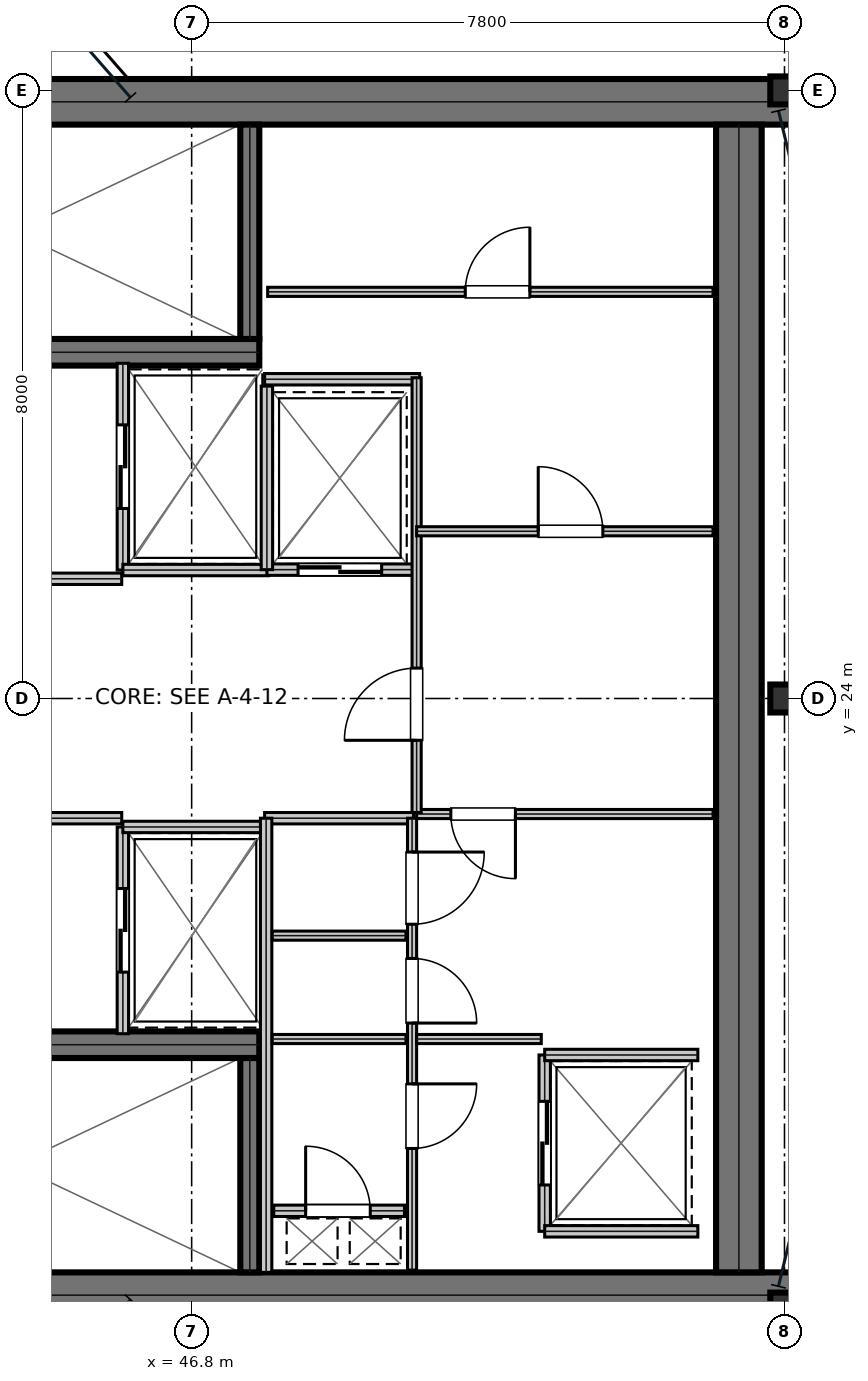
"""IFC4 building model, lengths in metres.
Left out: names, types, materials, properties, quantities, classifications, styles, units other than length and angle.
Written with IfcOpenShell. Run it as: python <this file> out.ifc"""

import sys

from ifc_helpers import new_model, si_unit, direction, frame, frame_2d, origin, origin_2d, place, context, subcontext, project, spatial, rectangle, i_section, extrude, element, fill, save


model = new_model("IFC4")
c1 = context("Model", 3, precision=1e-05, world=origin(), true_north=direction((0.0, 1.0)))
c2 = subcontext(c1, "Body", "Model", "MODEL_VIEW")
j1 = project(units=[si_unit("LENGTHUNIT", "METRE"), si_unit("PLANEANGLEUNIT", "RADIAN")], contexts=[c1])
p1 = place(None, origin())
s1 = spatial("IfcSite", under=j1, at=p1, CompositionType="ELEMENT")
p2 = place(p1, origin())
s2 = spatial("IfcBuilding", under=s1, at=p2, CompositionType="ELEMENT")
p3 = place(p2, frame((0.0, 0.0, 270.9)))
s3 = spatial("IfcBuildingStorey", under=s2, at=p3, CompositionType="ELEMENT", Elevation=270.9)
for number, where, z_axis, x_axis in (
    (1, (38.8, 31.85, 0.0), (0.0, 0.0, 1.0), (1.0, 0.0, 0.0)),
    (2, (38.8, 16.15, 0.0), (0.0, 0.0, 1.0), (1.0, 0.0, 0.0)),
):
    element("IfcWall", number, at=place(p3, frame(where, z_axis=z_axis, x_axis=x_axis)), inside=s3, PredefinedType="SHEAR", context=c2, shape_type="SweptSolid", body=[
        extrude(rectangle(XDim=16.0, YDim=0.6, at=frame_2d((8.0, 0.0))), origin(), (0.0, 0.0, 1.0), 3.81),
    ])
p4 = place(p3, frame((54.0, 16.45, 0.0), z_axis=(0.0, 0.0, 1.0), x_axis=(0.0, 1.0, 0.0)))
e3 = element("IfcWall", 3, at=p4, inside=s3, PredefinedType="SHEAR", context=c2, shape_type="SweptSolid", body=[
    extrude(rectangle(XDim=15.1, YDim=0.6, at=frame_2d((7.55, 0.0))), origin(), (0.0, 0.0, 1.0), 3.81),
])
p5 = place(p3, frame((39.98, 28.555, 0.0), z_axis=(0.0, 0.0, 1.0), x_axis=(1.0, 0.0, 0.0)))
e4 = element("IfcWall", 4, at=p5, inside=s3, PredefinedType="SHEAR", context=c2, shape_type="SweptSolid", body=[
    extrude(rectangle(XDim=7.71, YDim=0.35, at=frame_2d((3.855, 0.0))), origin(), (0.0, 0.0, 1.0), 3.81),
])
p6 = place(p5, frame((0.25, 0.0, 0.0)))
e5 = element("IfcOpeningElement", 5, at=p6, cuts=e4, PredefinedType="OPENING", context=c2, shape_type="SweptSolid", body=[
    extrude(rectangle(XDim=1.1, YDim=2.15, at=frame_2d((0.55, 1.075))), frame((0.0, 0.185, 0.0), z_axis=(0.0, -1.0, 0.0), x_axis=(1.0, 0.0, 0.0)), (0.0, 0.0, 1.0), 0.37),
])
p7 = place(p3, frame((39.98, 19.445, 0.0), z_axis=(0.0, 0.0, 1.0), x_axis=(1.0, 0.0, 0.0)))
e6 = element("IfcWall", 6, at=p7, inside=s3, PredefinedType="SHEAR", context=c2, shape_type="SweptSolid", body=[
    extrude(rectangle(XDim=7.71, YDim=0.35, at=frame_2d((3.855, 0.0))), origin(), (0.0, 0.0, 1.0), 3.81),
])
p8 = place(p7, frame((0.25, 0.0, 0.0)))
e7 = element("IfcOpeningElement", 7, at=p8, cuts=e6, PredefinedType="OPENING", context=c2, shape_type="SweptSolid", body=[
    extrude(rectangle(XDim=1.1, YDim=2.15, at=frame_2d((0.55, 1.075))), frame((0.0, 0.185, 0.0), z_axis=(0.0, -1.0, 0.0), x_axis=(1.0, 0.0, 0.0)), (0.0, 0.0, 1.0), 0.37),
])
for number, where, z_axis, x_axis in (
    (8, (47.565, 28.73, 0.0), (0.0, 0.0, 1.0), (0.0, 1.0, 0.0)),
    (9, (47.565, 16.45, 0.0), (0.0, 0.0, 1.0), (0.0, 1.0, 0.0)),
):
    element("IfcWall", number, at=place(p3, frame(where, z_axis=z_axis, x_axis=x_axis)), inside=s3, PredefinedType="SHEAR", context=c2, shape_type="SweptSolid", body=[
        extrude(rectangle(XDim=2.82, YDim=0.25, at=frame_2d((1.41, 0.0))), origin(), (0.0, 0.0, 1.0), 3.81),
    ])
for number, where, z_axis, x_axis in (
    (10, (54.6, 16.0, 0.0), (0.0, 0.0, 1.0), (1.0, 0.0, 0.0)),
    (11, (54.6, 24.0, 0.0), (0.0, 0.0, 1.0), (1.0, 0.0, 0.0)),
    (12, (54.6, 32.0, 0.0), (0.0, 0.0, 1.0), (1.0, 0.0, 0.0)),
):
    element("IfcColumn", number, at=place(p3, frame(where, z_axis=z_axis, x_axis=x_axis)), inside=s3, PredefinedType="COLUMN", context=c2, shape_type="SweptSolid", body=[
        extrude(i_section(OverallWidth=0.373, OverallDepth=0.368, WebThickness=0.015, FlangeThickness=0.024, at=origin_2d()), origin(), (0.0, 0.0, 1.0), 4.044),
    ])
p9 = place(p3, frame((39.98, 25.575, 0.0), z_axis=(0.0, 0.0, 1.0), x_axis=(1.0, 0.0, 0.0)))
e13 = element("IfcWall", 13, at=p9, inside=s3, PredefinedType="PARTITIONING", context=c2, shape_type="SweptSolid", body=[
    extrude(rectangle(XDim=5.9, YDim=0.15, at=frame_2d((2.95, 0.0))), origin(), (0.0, 0.0, 1.0), 3.81),
])
p10 = place(p9, frame((2.35, 0.0, 0.0)))
e14 = element("IfcOpeningElement", 14, at=p10, cuts=e13, PredefinedType="OPENING", context=c2, shape_type="SweptSolid", body=[
    extrude(rectangle(XDim=1.05, YDim=2.15, at=frame_2d((0.525, 1.075))), frame((0.0, 0.085, 0.0), z_axis=(0.0, -1.0, 0.0), x_axis=(1.0, 0.0, 0.0)), (0.0, 0.0, 1.0), 0.17),
])
p11 = place(p3, frame((39.98, 22.425, 0.0), z_axis=(0.0, 0.0, 1.0), x_axis=(1.0, 0.0, 0.0)))
e15 = element("IfcWall", 15, at=p11, inside=s3, PredefinedType="PARTITIONING", context=c2, shape_type="SweptSolid", body=[
    extrude(rectangle(XDim=5.9, YDim=0.15, at=frame_2d((2.95, 0.0))), origin(), (0.0, 0.0, 1.0), 3.81),
])
p12 = place(p11, frame((2.35, 0.0, 0.0)))
e16 = element("IfcOpeningElement", 16, at=p12, cuts=e15, PredefinedType="OPENING", context=c2, shape_type="SweptSolid", body=[
    extrude(rectangle(XDim=1.05, YDim=2.15, at=frame_2d((0.525, 1.075))), frame((0.0, 0.085, 0.0), z_axis=(0.0, -1.0, 0.0), x_axis=(1.0, 0.0, 0.0)), (0.0, 0.0, 1.0), 0.17),
])
p13 = place(p3, frame((45.895, 25.69, 0.0), z_axis=(0.0, 0.0, 1.0), x_axis=(0.0, 1.0, 0.0)))
e17 = element("IfcWall", 17, at=p13, inside=s3, PredefinedType="PARTITIONING", context=c2, shape_type="SweptSolid", body=[
    extrude(rectangle(XDim=2.72, YDim=0.15, at=frame_2d((1.36, 0.0))), origin(), (0.0, 0.0, 1.0), 3.81),
])
p14 = place(p13, frame((0.81, 0.0, 0.0)))
e18 = element("IfcOpeningElement", 18, at=p14, cuts=e17, PredefinedType="OPENING", context=c2, shape_type="SweptSolid", body=[
    extrude(rectangle(XDim=1.1, YDim=2.15, at=frame_2d((0.55, 1.075))), frame((0.0, 0.085, 0.0), z_axis=(0.0, -1.0, 0.0), x_axis=(1.0, 0.0, 0.0)), (0.0, 0.0, 1.0), 0.17),
])
p15 = place(p3, frame((45.895, 25.69, 0.0), z_axis=(0.0, 0.0, 1.0), x_axis=(1.0, 0.0, 0.0)))
e19 = element("IfcWall", 19, at=p15, inside=s3, PredefinedType="PARTITIONING", context=c2, shape_type="SweptSolid", body=[
    extrude(rectangle(XDim=1.915, YDim=0.15, at=frame_2d((0.958, 0.0))), origin(), (0.0, 0.0, 1.0), 3.81),
])
p16 = place(p3, frame((45.895, 19.59, 0.0), z_axis=(0.0, 0.0, 1.0), x_axis=(0.0, 1.0, 0.0)))
e20 = element("IfcWall", 20, at=p16, inside=s3, PredefinedType="PARTITIONING", context=c2, shape_type="SweptSolid", body=[
    extrude(rectangle(XDim=2.72, YDim=0.15, at=frame_2d((1.36, 0.0))), origin(), (0.0, 0.0, 1.0), 3.81),
])
p17 = place(p16, frame((0.81, 0.0, 0.0)))
e21 = element("IfcOpeningElement", 21, at=p17, cuts=e20, PredefinedType="OPENING", context=c2, shape_type="SweptSolid", body=[
    extrude(rectangle(XDim=1.1, YDim=2.15, at=frame_2d((0.55, 1.075))), frame((0.0, 0.085, 0.0), z_axis=(0.0, -1.0, 0.0), x_axis=(1.0, 0.0, 0.0)), (0.0, 0.0, 1.0), 0.17),
])
p18 = place(p3, frame((45.895, 22.31, 0.0), z_axis=(0.0, 0.0, 1.0), x_axis=(1.0, 0.0, 0.0)))
e22 = element("IfcWall", 22, at=p18, inside=s3, PredefinedType="PARTITIONING", context=c2, shape_type="SweptSolid", body=[
    extrude(rectangle(XDim=1.915, YDim=0.15, at=frame_2d((0.958, 0.0))), origin(), (0.0, 0.0, 1.0), 3.81),
])
p19 = place(p3, frame((47.79, 25.695, 0.0), z_axis=(0.0, 0.0, 1.0), x_axis=(1.0, 0.0, 0.0)))
e23 = element("IfcWall", 23, at=p19, inside=s3, PredefinedType="PARTITIONING", context=c2, shape_type="SweptSolid", body=[
    extrude(rectangle(XDim=1.92, YDim=0.15, at=frame_2d((0.96, 0.0))), origin(), (0.0, 0.0, 1.0), 3.81),
])
p20 = place(p19, frame((0.41, 0.0, 0.0)))
e24 = element("IfcOpeningElement", 24, at=p20, cuts=e23, PredefinedType="OPENING", context=c2, shape_type="SweptSolid", body=[
    extrude(rectangle(XDim=1.1, YDim=2.15, at=frame_2d((0.55, 1.075))), frame((0.0, 0.085, 0.0), z_axis=(0.0, -1.0, 0.0), x_axis=(1.0, 0.0, 0.0)), (0.0, 0.0, 1.0), 0.17),
])
p21 = place(p3, frame((47.79, 25.695, 0.0), z_axis=(0.0, 0.0, 1.0), x_axis=(0.0, 1.0, 0.0)))
e25 = element("IfcWall", 25, at=p21, inside=s3, PredefinedType="PARTITIONING", context=c2, shape_type="SweptSolid", body=[
    extrude(rectangle(XDim=2.415, YDim=0.15, at=frame_2d((1.208, 0.0))), origin(), (0.0, 0.0, 1.0), 3.81),
])
p22 = place(p3, frame((51.445, 16.99, 0.0), z_axis=(0.0, 0.0, 1.0), x_axis=(0.0, 1.0, 0.0)))
e26 = element("IfcWall", 26, at=p22, inside=s3, PredefinedType="PARTITIONING", context=c2, shape_type="SweptSolid", body=[
    extrude(rectangle(XDim=2.32, YDim=0.15, at=frame_2d((1.16, 0.0))), origin(), (0.0, 0.0, 1.0), 3.81),
])
p23 = place(p22, frame((0.61, 0.0, 0.0)))
e27 = element("IfcOpeningElement", 27, at=p23, cuts=e26, PredefinedType="OPENING", context=c2, shape_type="SweptSolid", body=[
    extrude(rectangle(XDim=1.1, YDim=2.15, at=frame_2d((0.55, 1.075))), frame((0.0, 0.085, 0.0), z_axis=(0.0, -1.0, 0.0), x_axis=(1.0, 0.0, 0.0)), (0.0, 0.0, 1.0), 0.17),
])
for number, where, z_axis, x_axis in (
    (28, (51.445, 16.99, 0.0), (0.0, 0.0, 1.0), (1.0, 0.0, 0.0)),
    (29, (51.445, 19.31, 0.0), (0.0, 0.0, 1.0), (1.0, 0.0, 0.0)),
):
    element("IfcWall", number, at=place(p3, frame(where, z_axis=z_axis, x_axis=x_axis)), inside=s3, PredefinedType="PARTITIONING", context=c2, shape_type="SweptSolid", body=[
        extrude(rectangle(XDim=2.015, YDim=0.15, at=frame_2d((1.007, 0.0))), origin(), (0.0, 0.0, 1.0), 3.81),
    ])
p24 = place(p3, frame((47.88, 17.26, 0.0), z_axis=(0.0, 0.0, 1.0), x_axis=(1.0, 0.0, 0.0)))
e30 = element("IfcWall", 30, at=p24, inside=s3, PredefinedType="PARTITIONING", context=c2, shape_type="SweptSolid", body=[
    extrude(rectangle(XDim=1.72, YDim=0.15, at=frame_2d((0.86, 0.0))), origin(), (0.0, 0.0, 1.0), 3.81),
])
p25 = place(p24, frame((0.42, 0.0, 0.0)))
e31 = element("IfcOpeningElement", 31, at=p25, cuts=e30, PredefinedType="OPENING", context=c2, shape_type="SweptSolid", body=[
    extrude(rectangle(XDim=0.85, YDim=2.15, at=frame_2d((0.425, 1.075))), frame((0.0, 0.085, 0.0), z_axis=(0.0, -1.0, 0.0), x_axis=(1.0, 0.0, 0.0)), (0.0, 0.0, 1.0), 0.17),
])
p26 = place(p3, frame((47.76, 22.425, 0.0), z_axis=(0.0, 0.0, 1.0), x_axis=(1.0, 0.0, 0.0)))
e32 = element("IfcWall", 32, at=p26, inside=s3, PredefinedType="PARTITIONING", context=c2, shape_type="SweptSolid", body=[
    extrude(rectangle(XDim=1.96, YDim=0.15, at=frame_2d((0.98, 0.0))), origin(), (0.0, 0.0, 1.0), 3.81),
])
p27 = place(p3, frame((47.78, 16.45, 0.0), z_axis=(0.0, 0.0, 1.0), x_axis=(0.0, 1.0, 0.0)))
e33 = element("IfcWall", 33, at=p27, inside=s3, PredefinedType="PARTITIONING", context=c2, shape_type="SweptSolid", body=[
    extrude(rectangle(XDim=5.975, YDim=0.15, at=frame_2d((2.988, 0.0))), origin(), (0.0, 0.0, 1.0), 3.81),
])
for number, where, z_axis, x_axis in (
    (34, (47.86, 19.52, 0.0), (0.0, 0.0, 1.0), (1.0, 0.0, 0.0)),
    (35, (47.86, 20.88, 0.0), (0.0, 0.0, 1.0), (1.0, 0.0, 0.0)),
):
    element("IfcWall", number, at=place(p3, frame(where, z_axis=z_axis, x_axis=x_axis)), inside=s3, PredefinedType="PARTITIONING", context=c2, shape_type="SweptSolid", body=[
        extrude(rectangle(XDim=1.76, YDim=0.12, at=frame_2d((0.88, 0.0))), origin(), (0.0, 0.0, 1.0), 3.81),
    ])
p28 = place(p3, frame((49.7, 16.48, 0.0), z_axis=(0.0, 0.0, 1.0), x_axis=(0.0, 1.0, 0.0)))
e36 = element("IfcWall", 36, at=p28, inside=s3, PredefinedType="PARTITIONING", context=c2, shape_type="SweptSolid", body=[
    extrude(rectangle(XDim=5.945, YDim=0.12, at=frame_2d((2.973, 0.0))), origin(), (0.0, 0.0, 1.0), 3.81),
])
p29 = place(p28, frame((1.6, 0.0, 0.0)))
e37 = element("IfcOpeningElement", 37, at=p29, cuts=e36, PredefinedType="OPENING", context=c2, shape_type="SweptSolid", body=[
    extrude(rectangle(XDim=0.85, YDim=2.15, at=frame_2d((0.425, 1.075))), frame((0.0, 0.07, 0.0), z_axis=(0.0, -1.0, 0.0), x_axis=(1.0, 0.0, 0.0)), (0.0, 0.0, 1.0), 0.14),
])
p30 = place(p28, frame((3.25, 0.0, 0.0)))
e38 = element("IfcOpeningElement", 38, at=p30, cuts=e36, PredefinedType="OPENING", context=c2, shape_type="SweptSolid", body=[
    extrude(rectangle(XDim=0.85, YDim=2.15, at=frame_2d((0.425, 1.075))), frame((0.0, 0.07, 0.0), z_axis=(0.0, -1.0, 0.0), x_axis=(1.0, 0.0, 0.0)), (0.0, 0.0, 1.0), 0.14),
])
p31 = place(p28, frame((4.55, 0.0, 0.0)))
e39 = element("IfcOpeningElement", 39, at=p31, cuts=e36, PredefinedType="OPENING", context=c2, shape_type="SweptSolid", body=[
    extrude(rectangle(XDim=0.95, YDim=2.15, at=frame_2d((0.475, 1.075))), frame((0.0, 0.07, 0.0), z_axis=(0.0, -1.0, 0.0), x_axis=(1.0, 0.0, 0.0)), (0.0, 0.0, 1.0), 0.14),
])
p32 = place(p3, frame((49.76, 22.48, 0.0), z_axis=(0.0, 0.0, 1.0), x_axis=(1.0, 0.0, 0.0)))
e40 = element("IfcWall", 40, at=p32, inside=s3, PredefinedType="PARTITIONING", context=c2, shape_type="SweptSolid", body=[
    extrude(rectangle(XDim=3.9, YDim=0.12, at=frame_2d((1.95, 0.0))), origin(), (0.0, 0.0, 1.0), 3.81),
])
p33 = place(p32, frame((0.45, 0.0, 0.0)))
e41 = element("IfcOpeningElement", 41, at=p33, cuts=e40, PredefinedType="OPENING", context=c2, shape_type="SweptSolid", body=[
    extrude(rectangle(XDim=0.85, YDim=2.15, at=frame_2d((0.425, 1.075))), frame((0.0, 0.07, 0.0), z_axis=(0.0, -1.0, 0.0), x_axis=(1.0, 0.0, 0.0)), (0.0, 0.0, 1.0), 0.14),
])
p34 = place(p3, frame((49.76, 19.52, 0.0), z_axis=(0.0, 0.0, 1.0), x_axis=(1.0, 0.0, 0.0)))
e42 = element("IfcWall", 42, at=p34, inside=s3, PredefinedType="PARTITIONING", context=c2, shape_type="SweptSolid", body=[
    extrude(rectangle(XDim=1.64, YDim=0.12, at=frame_2d((0.82, 0.0))), origin(), (0.0, 0.0, 1.0), 3.81),
])
p35 = place(p3, frame((47.76, 28.2, 0.0), z_axis=(0.0, 0.0, 1.0), x_axis=(1.0, 0.0, 0.0)))
e43 = element("IfcWall", 43, at=p35, inside=s3, PredefinedType="PARTITIONING", context=c2, shape_type="SweptSolid", body=[
    extrude(rectangle(XDim=2.04, YDim=0.15, at=frame_2d((1.02, 0.0))), origin(), (0.0, 0.0, 1.0), 3.81),
])
p36 = place(p3, frame((49.76, 22.5, 0.0), z_axis=(0.0, 0.0, 1.0), x_axis=(0.0, 1.0, 0.0)))
e44 = element("IfcWall", 44, at=p36, inside=s3, PredefinedType="PARTITIONING", context=c2, shape_type="SweptSolid", body=[
    extrude(rectangle(XDim=5.72, YDim=0.12, at=frame_2d((2.86, 0.0))), origin(), (0.0, 0.0, 1.0), 3.81),
])
p37 = place(p36, frame((0.95, 0.0, 0.0)))
e45 = element("IfcOpeningElement", 45, at=p37, cuts=e44, PredefinedType="OPENING", context=c2, shape_type="SweptSolid", body=[
    extrude(rectangle(XDim=0.95, YDim=2.15, at=frame_2d((0.475, 1.075))), frame((0.0, 0.07, 0.0), z_axis=(0.0, -1.0, 0.0), x_axis=(1.0, 0.0, 0.0)), (0.0, 0.0, 1.0), 0.14),
])
p38 = place(p3, frame((49.76, 26.2, 0.0), z_axis=(0.0, 0.0, 1.0), x_axis=(1.0, 0.0, 0.0)))
e46 = element("IfcWall", 46, at=p38, inside=s3, PredefinedType="PARTITIONING", context=c2, shape_type="SweptSolid", body=[
    extrude(rectangle(XDim=3.9, YDim=0.12, at=frame_2d((1.95, 0.0))), origin(), (0.0, 0.0, 1.0), 3.81),
])
p39 = place(p38, frame((1.6, 0.0, 0.0)))
e47 = element("IfcOpeningElement", 47, at=p39, cuts=e46, PredefinedType="OPENING", context=c2, shape_type="SweptSolid", body=[
    extrude(rectangle(XDim=0.85, YDim=2.15, at=frame_2d((0.425, 1.075))), frame((0.0, 0.07, 0.0), z_axis=(0.0, -1.0, 0.0), x_axis=(1.0, 0.0, 0.0)), (0.0, 0.0, 1.0), 0.14),
])
p40 = place(p3, frame((47.8, 29.35, 0.0), z_axis=(0.0, 0.0, 1.0), x_axis=(1.0, 0.0, 0.0)))
e48 = element("IfcWall", 48, at=p40, inside=s3, PredefinedType="PARTITIONING", context=c2, shape_type="SweptSolid", body=[
    extrude(rectangle(XDim=5.86, YDim=0.12, at=frame_2d((2.93, 0.0))), origin(), (0.0, 0.0, 1.0), 3.81),
])
p41 = place(p40, frame((2.6, 0.0, 0.0)))
e49 = element("IfcOpeningElement", 49, at=p41, cuts=e48, PredefinedType="OPENING", context=c2, shape_type="SweptSolid", body=[
    extrude(rectangle(XDim=0.85, YDim=2.15, at=frame_2d((0.425, 1.075))), frame((0.0, 0.07, 0.0), z_axis=(0.0, -1.0, 0.0), x_axis=(1.0, 0.0, 0.0)), (0.0, 0.0, 1.0), 0.14),
])
p42 = place(p14, frame((1.1, 0.0, 0.0), z_axis=(0.0, 0.0, 1.0), x_axis=(-1.0, 0.0, 0.0)))
e50 = element("IfcDoor", 50, at=p42, inside=s3, OperationType="DOUBLE_DOOR_SLIDING", PredefinedType="DOOR", context=c2, shape_type="SweptSolid", body=[
    extrude(rectangle(XDim=1.1, YDim=2.15, at=frame_2d((0.55, 1.075))), frame((0.0, 0.025, 0.0), z_axis=(0.0, -1.0, 0.0), x_axis=(1.0, 0.0, 0.0)), (0.0, 0.0, 1.0), 0.05),
])
fill(e18, e50)
p43 = place(p17, frame((1.1, 0.0, 0.0), z_axis=(0.0, 0.0, 1.0), x_axis=(-1.0, 0.0, 0.0)))
e51 = element("IfcDoor", 51, at=p43, inside=s3, OperationType="DOUBLE_DOOR_SLIDING", PredefinedType="DOOR", context=c2, shape_type="SweptSolid", body=[
    extrude(rectangle(XDim=1.1, YDim=2.15, at=frame_2d((0.55, 1.075))), frame((0.0, 0.025, 0.0), z_axis=(0.0, -1.0, 0.0), x_axis=(1.0, 0.0, 0.0)), (0.0, 0.0, 1.0), 0.05),
])
fill(e21, e51)
p44 = place(p20, frame((1.1, 0.0, 0.0), z_axis=(0.0, 0.0, 1.0), x_axis=(-1.0, 0.0, 0.0)))
e52 = element("IfcDoor", 52, at=p44, inside=s3, OperationType="DOUBLE_DOOR_SLIDING", PredefinedType="DOOR", context=c2, shape_type="SweptSolid", body=[
    extrude(rectangle(XDim=1.1, YDim=2.15, at=frame_2d((0.55, 1.075))), frame((0.0, 0.025, 0.0), z_axis=(0.0, -1.0, 0.0), x_axis=(1.0, 0.0, 0.0)), (0.0, 0.0, 1.0), 0.05),
])
fill(e24, e52)
p45 = place(p23, frame((1.1, 0.0, 0.0), z_axis=(0.0, 0.0, 1.0), x_axis=(-1.0, 0.0, 0.0)))
e53 = element("IfcDoor", 53, at=p45, inside=s3, OperationType="DOUBLE_DOOR_SLIDING", PredefinedType="DOOR", context=c2, shape_type="SweptSolid", body=[
    extrude(rectangle(XDim=1.1, YDim=2.15, at=frame_2d((0.55, 1.075))), frame((0.0, 0.025, 0.0), z_axis=(0.0, -1.0, 0.0), x_axis=(1.0, 0.0, 0.0)), (0.0, 0.0, 1.0), 0.05),
])
fill(e27, e53)
p46 = place(p25, origin())
e54 = element("IfcDoor", 54, at=p46, inside=s3, OperationType="SINGLE_SWING_LEFT", PredefinedType="TRAPDOOR", context=c2, shape_type="SweptSolid", body=[
    extrude(rectangle(XDim=0.85, YDim=2.15, at=frame_2d((0.425, 1.075))), frame((0.0, 0.025, 0.0), z_axis=(0.0, -1.0, 0.0), x_axis=(1.0, 0.0, 0.0)), (0.0, 0.0, 1.0), 0.05),
])
fill(e31, e54)
p47 = place(p29, frame((0.85, 0.0, 0.0), z_axis=(0.0, 0.0, 1.0), x_axis=(-1.0, 0.0, 0.0)))
e55 = element("IfcDoor", 55, at=p47, inside=s3, OperationType="SINGLE_SWING_LEFT", PredefinedType="DOOR", context=c2, shape_type="SweptSolid", body=[
    extrude(rectangle(XDim=0.85, YDim=2.15, at=frame_2d((0.425, 1.075))), frame((0.0, 0.025, 0.0), z_axis=(0.0, -1.0, 0.0), x_axis=(1.0, 0.0, 0.0)), (0.0, 0.0, 1.0), 0.05),
])
fill(e37, e55)
p48 = place(p30, frame((0.85, 0.0, 0.0), z_axis=(0.0, 0.0, 1.0), x_axis=(-1.0, 0.0, 0.0)))
e56 = element("IfcDoor", 56, at=p48, inside=s3, OperationType="SINGLE_SWING_RIGHT", PredefinedType="DOOR", context=c2, shape_type="SweptSolid", body=[
    extrude(rectangle(XDim=0.85, YDim=2.15, at=frame_2d((0.425, 1.075))), frame((0.0, 0.025, 0.0), z_axis=(0.0, -1.0, 0.0), x_axis=(1.0, 0.0, 0.0)), (0.0, 0.0, 1.0), 0.05),
])
fill(e38, e56)
p49 = place(p31, frame((0.95, 0.0, 0.0), z_axis=(0.0, 0.0, 1.0), x_axis=(-1.0, 0.0, 0.0)))
e57 = element("IfcDoor", 57, at=p49, inside=s3, OperationType="SINGLE_SWING_LEFT", PredefinedType="DOOR", context=c2, shape_type="SweptSolid", body=[
    extrude(rectangle(XDim=0.95, YDim=2.15, at=frame_2d((0.475, 1.075))), frame((0.0, 0.025, 0.0), z_axis=(0.0, -1.0, 0.0), x_axis=(1.0, 0.0, 0.0)), (0.0, 0.0, 1.0), 0.05),
])
fill(e39, e57)
p50 = place(p33, frame((0.85, 0.0, 0.0), z_axis=(0.0, 0.0, 1.0), x_axis=(-1.0, 0.0, 0.0)))
e58 = element("IfcDoor", 58, at=p50, inside=s3, OperationType="SINGLE_SWING_LEFT", PredefinedType="DOOR", context=c2, shape_type="SweptSolid", body=[
    extrude(rectangle(XDim=0.85, YDim=2.15, at=frame_2d((0.425, 1.075))), frame((0.0, 0.025, 0.0), z_axis=(0.0, -1.0, 0.0), x_axis=(1.0, 0.0, 0.0)), (0.0, 0.0, 1.0), 0.05),
])
fill(e41, e58)
p51 = place(p37, origin())
e59 = element("IfcDoor", 59, at=p51, inside=s3, OperationType="SINGLE_SWING_LEFT", PredefinedType="DOOR", context=c2, shape_type="SweptSolid", body=[
    extrude(rectangle(XDim=0.95, YDim=2.15, at=frame_2d((0.475, 1.075))), frame((0.0, 0.025, 0.0), z_axis=(0.0, -1.0, 0.0), x_axis=(1.0, 0.0, 0.0)), (0.0, 0.0, 1.0), 0.05),
])
fill(e45, e59)
p52 = place(p39, origin())
e60 = element("IfcDoor", 60, at=p52, inside=s3, OperationType="SINGLE_SWING_LEFT", PredefinedType="DOOR", context=c2, shape_type="SweptSolid", body=[
    extrude(rectangle(XDim=0.85, YDim=2.15, at=frame_2d((0.425, 1.075))), frame((0.0, 0.025, 0.0), z_axis=(0.0, -1.0, 0.0), x_axis=(1.0, 0.0, 0.0)), (0.0, 0.0, 1.0), 0.05),
])
fill(e47, e60)
p53 = place(p41, origin())
e61 = element("IfcDoor", 61, at=p53, inside=s3, OperationType="SINGLE_SWING_RIGHT", PredefinedType="DOOR", context=c2, shape_type="SweptSolid", body=[
    extrude(rectangle(XDim=0.85, YDim=2.15, at=frame_2d((0.425, 1.075))), frame((0.0, 0.025, 0.0), z_axis=(0.0, -1.0, 0.0), x_axis=(1.0, 0.0, 0.0)), (0.0, 0.0, 1.0), 0.05),
])
fill(e49, e61)
save(model, sys.argv[1])
